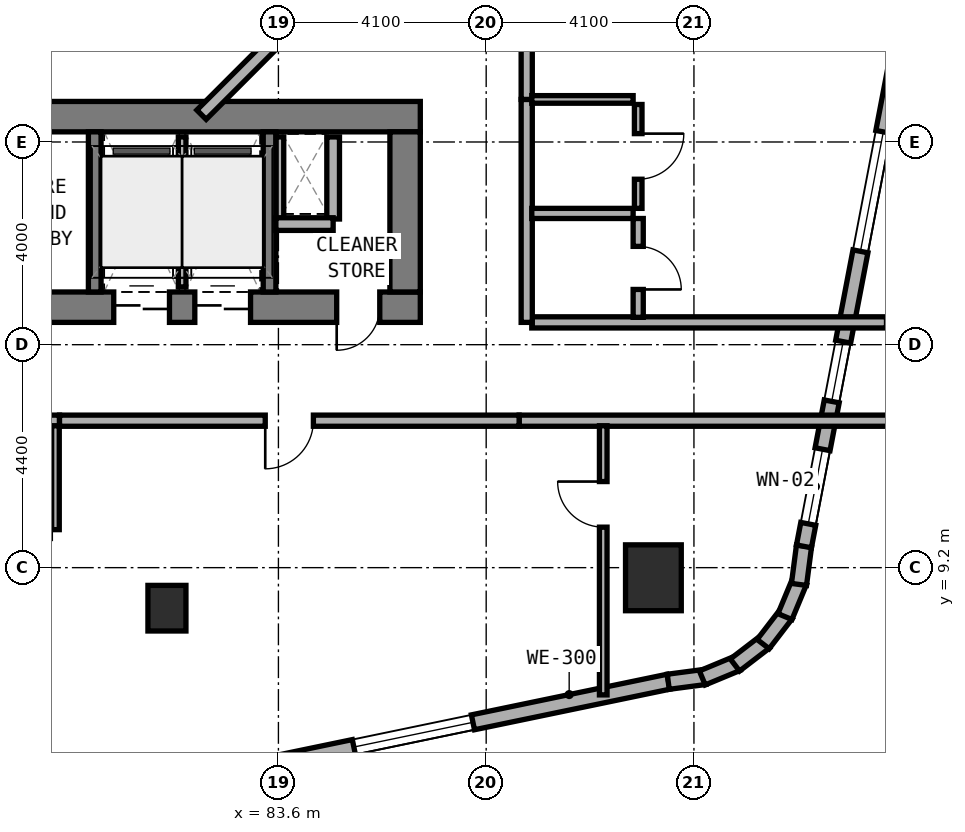
"""IFC4 building model, lengths in metres.
Left out: names, types, materials, properties, quantities, classifications, styles, units other than length and angle.
Written with IfcOpenShell. Run it as: python <this file> out.ifc"""

import sys

from ifc_helpers import new_model, si_unit, direction, frame, frame_2d, origin, origin_2d, place, context, subcontext, project, spatial, rectangle, extrude, element, fill, save


model = new_model("IFC4")
c1 = context("Model", 3, precision=1e-05, world=origin(), true_north=direction((0.0, 1.0)))
c2 = subcontext(c1, "Body", "Model", "MODEL_VIEW")
j1 = project(units=[si_unit("LENGTHUNIT", "METRE"), si_unit("PLANEANGLEUNIT", "RADIAN")], contexts=[c1])
p1 = place(None, origin())
s1 = spatial("IfcSite", under=j1, at=p1, CompositionType="ELEMENT")
p2 = place(p1, origin())
s2 = spatial("IfcBuilding", under=s1, at=p2, CompositionType="ELEMENT")
p3 = place(p2, frame((0.0, 0.0, 48.5)))
s3 = spatial("IfcBuildingStorey", under=s2, at=p3, CompositionType="ELEMENT", Elevation=48.5)
p4 = place(p3, frame((67.8, 14.34, 0.0), z_axis=(0.0, 0.0, 1.0), x_axis=(1.0, 0.0, 0.0)))
e1 = element("IfcWall", 1, at=p4, inside=s3, PredefinedType="SHEAR", context=c2, shape_type="SweptSolid", body=[
    extrude(rectangle(XDim=18.6, YDim=0.6, at=frame_2d((9.3, 0.0))), origin(), (0.0, 0.0, 1.0), 3.5),
])
p5 = place(p4, frame((9.35, 0.0, 0.0)))
e2 = element("IfcOpeningElement", 2, at=p5, cuts=e1, PredefinedType="OPENING", context=c2, shape_type="SweptSolid", body=[
    extrude(rectangle(XDim=1.2, YDim=2.15, at=frame_2d((0.6, 1.075))), frame((0.0, 0.31, 0.0), z_axis=(0.0, -1.0, 0.0), x_axis=(1.0, 0.0, 0.0)), (0.0, 0.0, 1.0), 0.62),
])
p6 = place(p4, frame((16.95, 0.0, 0.0)))
e3 = element("IfcOpeningElement", 3, at=p6, cuts=e1, PredefinedType="OPENING", context=c2, shape_type="SweptSolid", body=[
    extrude(rectangle(XDim=0.85, YDim=2.1, at=frame_2d((0.425, 1.05))), frame((0.0, 0.31, 0.0), z_axis=(0.0, -1.0, 0.0), x_axis=(1.0, 0.0, 0.0)), (0.0, 0.0, 1.0), 0.62),
])
p7 = place(p4, frame((12.55, 0.0, 0.0)))
e4 = element("IfcOpeningElement", 4, at=p7, cuts=e1, PredefinedType="OPENING", context=c2, shape_type="SweptSolid", body=[
    extrude(rectangle(XDim=1.1, YDim=2.15, at=frame_2d((0.55, 1.075))), frame((0.0, 0.31, 0.0), z_axis=(0.0, -1.0, 0.0), x_axis=(1.0, 0.0, 0.0)), (0.0, 0.0, 1.0), 0.62),
])
p8 = place(p4, frame((14.15, 0.0, 0.0)))
e5 = element("IfcOpeningElement", 5, at=p8, cuts=e1, PredefinedType="OPENING", context=c2, shape_type="SweptSolid", body=[
    extrude(rectangle(XDim=1.1, YDim=2.15, at=frame_2d((0.55, 1.075))), frame((0.0, 0.31, 0.0), z_axis=(0.0, -1.0, 0.0), x_axis=(1.0, 0.0, 0.0)), (0.0, 0.0, 1.0), 0.62),
])
p9 = place(p3, frame((67.8, 18.1, 0.0), z_axis=(0.0, 0.0, 1.0), x_axis=(1.0, 0.0, 0.0)))
e6 = element("IfcWall", 6, at=p9, inside=s3, PredefinedType="SHEAR", context=c2, shape_type="SweptSolid", body=[
    extrude(rectangle(XDim=18.6, YDim=0.6, at=frame_2d((9.3, 0.0))), origin(), (0.0, 0.0, 1.0), 3.5),
])
p10 = place(p3, frame((86.1, 14.64, 0.0), z_axis=(0.0, 0.0, 1.0), x_axis=(0.0, 1.0, 0.0)))
e7 = element("IfcWall", 7, at=p10, inside=s3, PredefinedType="SHEAR", context=c2, shape_type="SweptSolid", body=[
    extrude(rectangle(XDim=3.16, YDim=0.6, at=frame_2d((1.58, 0.0))), origin(), (0.0, 0.0, 1.0), 3.5),
])
for number, where, z_axis, x_axis in (
    (8, (79.975, 14.64, 0.0), (0.0, 0.0, 1.0), (0.0, 1.0, 0.0)),
    (9, (83.425, 14.64, 0.0), (0.0, 0.0, 1.0), (0.0, 1.0, 0.0)),
):
    element("IfcWall", number, at=place(p3, frame(where, z_axis=z_axis, x_axis=x_axis)), inside=s3, PredefinedType="STANDARD", context=c2, shape_type="SweptSolid", body=[
        extrude(rectangle(XDim=3.16, YDim=0.25, at=frame_2d((1.58, 0.0))), origin(), (0.0, 0.0, 1.0), 3.25),
    ])
p11 = place(p3, frame((81.4, 8.4, 0.0), z_axis=(0.0, 0.0, 1.0), x_axis=(1.0, 0.0, 0.0)))
e10 = element("IfcColumn", 10, at=p11, inside=s3, PredefinedType="COLUMN", context=c2, shape_type="SweptSolid", body=[
    extrude(rectangle(XDim=0.75, YDim=0.9, at=origin_2d()), origin(), (0.0, 0.0, 1.0), 3.5),
])
p12 = place(p3, frame((91.0, 9.0, 0.0), z_axis=(0.0, 0.0, 1.0), x_axis=(1.0, 0.0, 0.0)))
e11 = element("IfcColumn", 11, at=p12, inside=s3, PredefinedType="COLUMN", context=c2, shape_type="SweptSolid", body=[
    extrude(rectangle(XDim=1.1, YDim=1.3, at=origin_2d()), origin(), (0.0, 0.0, 1.0), 3.5),
])
p13 = place(p3, frame((82.594, 5.142, 0.0), z_axis=(0.0, 0.0, 1.0), x_axis=(0.979125485139, 0.203256695712, 0.0)))
e12 = element("IfcWall", 12, at=p13, inside=s3, PredefinedType="STANDARD", context=c2, shape_type="SweptSolid", body=[
    extrude(rectangle(XDim=8.89, YDim=0.3, at=frame_2d((4.445, 0.0))), origin(), (0.0, 0.0, 1.0), 3.25),
])
p14 = place(p13, frame((2.548, 0.0, 0.8)))
e13 = element("IfcOpeningElement", 13, at=p14, cuts=e12, PredefinedType="OPENING", context=c2, shape_type="SweptSolid", body=[
    extrude(rectangle(XDim=2.4, YDim=1.6, at=frame_2d((1.2, 0.8))), frame((0.0, 0.16, 0.0), z_axis=(0.0, -1.0, 0.0), x_axis=(1.0, 0.0, 0.0)), (0.0, 0.0, 1.0), 0.32),
])
p15 = place(p3, frame((91.293, 6.948, 0.0), z_axis=(0.0, 0.0, 1.0), x_axis=(0.991486167159, 0.13021205909, 0.0)))
e14 = element("IfcWall", 14, at=p15, inside=s3, PredefinedType="STANDARD", context=c2, shape_type="SweptSolid", body=[
    extrude(rectangle(XDim=0.729, YDim=0.3, at=frame_2d((0.365, 0.0))), origin(), (0.0, 0.0, 1.0), 3.25),
])
for number, where, z_axis, x_axis in (
    (15, (91.965, 7.024, 0.0), (0.0, 0.0, 1.0), (0.924, 0.384, 0.0)),
    (16, (92.609, 7.279, 0.0), (0.0, 0.0, 1.0), (0.794, 0.608, 0.0)),
    (17, (93.166, 7.691, 0.0), (0.0, 0.0, 1.0), (0.609, 0.793, 0.0)),
):
    element("IfcWall", number, at=place(p3, frame(where, z_axis=z_axis, x_axis=x_axis)), inside=s3, PredefinedType="STANDARD", context=c2, shape_type="SweptSolid", body=[
        extrude(rectangle(XDim=0.746, YDim=0.3, at=frame_2d((0.373, 0.0))), origin(), (0.0, 0.0, 1.0), 3.25),
    ])
p16 = place(p3, frame((93.596, 8.234, 0.0), z_axis=(0.0, 0.0, 1.0), x_axis=(0.383430326427, 0.923569805037, 0.0)))
e18 = element("IfcWall", 18, at=p16, inside=s3, PredefinedType="STANDARD", context=c2, shape_type="SweptSolid", body=[
    extrude(rectangle(XDim=0.746, YDim=0.3, at=frame_2d((0.373, 0.0))), origin(), (0.0, 0.0, 1.0), 3.25),
])
p17 = place(p3, frame((93.873, 8.869, 0.0), z_axis=(0.0, 0.0, 1.0), x_axis=(0.129339184068, 0.991600411186, 0.0)))
e19 = element("IfcWall", 19, at=p17, inside=s3, PredefinedType="STANDARD", context=c2, shape_type="SweptSolid", body=[
    extrude(rectangle(XDim=0.764, YDim=0.3, at=frame_2d((0.382, 0.0))), origin(), (0.0, 0.0, 1.0), 3.25),
])
p18 = place(p3, frame((93.971, 9.62, 0.0), z_axis=(0.0, 0.0, 1.0), x_axis=(0.188087874316, 0.982152203854, 0.0)))
e20 = element("IfcWall", 20, at=p18, inside=s3, PredefinedType="STANDARD", context=c2, shape_type="SweptSolid", body=[
    extrude(rectangle(XDim=9.634, YDim=0.3, at=frame_2d((4.817, 0.0))), origin(), (0.0, 0.0, 1.0), 3.25),
])
p19 = place(p18, frame((0.452, 0.0, 0.85)))
e21 = element("IfcOpeningElement", 21, at=p19, cuts=e20, PredefinedType="OPENING", context=c2, shape_type="SweptSolid", body=[
    extrude(rectangle(XDim=1.5, YDim=1.5, at=frame_2d((0.75, 0.75))), frame((0.0, 0.16, 0.0), z_axis=(0.0, -1.0, 0.0), x_axis=(1.0, 0.0, 0.0)), (0.0, 0.0, 1.0), 0.32),
])
p20 = place(p18, frame((2.913, 0.0, 0.85)))
e22 = element("IfcOpeningElement", 22, at=p20, cuts=e20, PredefinedType="OPENING", context=c2, shape_type="SweptSolid", body=[
    extrude(rectangle(XDim=1.2, YDim=1.5, at=frame_2d((0.6, 0.75))), frame((0.0, 0.16, 0.0), z_axis=(0.0, -1.0, 0.0), x_axis=(1.0, 0.0, 0.0)), (0.0, 0.0, 1.0), 0.32),
])
p21 = place(p18, frame((5.928, 0.0, 0.8)))
e23 = element("IfcOpeningElement", 23, at=p21, cuts=e20, PredefinedType="OPENING", context=c2, shape_type="SweptSolid", body=[
    extrude(rectangle(XDim=2.4, YDim=1.6, at=frame_2d((1.2, 0.8))), frame((0.0, 0.16, 0.0), z_axis=(0.0, -1.0, 0.0), x_axis=(1.0, 0.0, 0.0)), (0.0, 0.0, 1.0), 0.32),
])
p22 = place(p3, frame((82.082, 18.138, 0.0), z_axis=(0.0, 0.0, 1.0), x_axis=(0.707106781187, 0.707106781187, 0.0)))
e24 = element("IfcWall", 24, at=p22, inside=s3, PredefinedType="STANDARD", context=c2, shape_type="SweptSolid", body=[
    extrude(rectangle(XDim=2.311, YDim=0.26, at=frame_2d((1.155, 0.0))), origin(), (0.0, 0.0, 1.0), 3.25),
])
p23 = place(p3, frame((83.63, 16.08, 0.0), z_axis=(0.0, 0.0, 1.0), x_axis=(0.0, 1.0, 0.0)))
e25 = element("IfcWall", 25, at=p23, inside=s3, PredefinedType="PARTITIONING", context=c2, shape_type="SweptSolid", body=[
    extrude(rectangle(XDim=1.62, YDim=0.15, at=frame_2d((0.81, 0.0))), origin(), (0.0, 0.0, 1.0), 2.725),
])
p24 = place(p3, frame((84.68, 16.08, 0.0), z_axis=(0.0, 0.0, 1.0), x_axis=(0.0, 1.0, 0.0)))
e26 = element("IfcWall", 26, at=p24, inside=s3, PredefinedType="SOLIDWALL", context=c2, shape_type="SweptSolid", body=[
    extrude(rectangle(XDim=1.62, YDim=0.25, at=frame_2d((0.81, 0.0))), origin(), (0.0, 0.0, 1.0), 3.22),
])
p25 = place(p3, frame((83.55, 15.98, 0.0), z_axis=(0.0, 0.0, 1.0), x_axis=(1.0, 0.0, 0.0)))
e27 = element("IfcWall", 27, at=p25, inside=s3, PredefinedType="SOLIDWALL", context=c2, shape_type="SweptSolid", body=[
    extrude(rectangle(XDim=1.13, YDim=0.25, at=frame_2d((0.565, 0.0))), origin(), (0.0, 0.0, 1.0), 3.22),
])
p26 = place(p3, frame((81.7, 14.74, 0.0), z_axis=(0.0, 0.0, 1.0), x_axis=(0.0, 1.0, 0.0)))
e28 = element("IfcWall", 28, at=p26, inside=s3, PredefinedType="PARTITIONING", context=c2, shape_type="SweptSolid", body=[
    extrude(rectangle(XDim=2.96, YDim=0.15, at=frame_2d((1.48, 0.0))), origin(), (0.0, 0.0, 1.0), 3.22),
])
p27 = place(p3, frame((72.6, 12.1, 0.0), z_axis=(0.0, 0.0, 1.0), x_axis=(1.0, 0.0, 0.0)))
e29 = element("IfcWall", 29, at=p27, inside=s3, PredefinedType="SOLIDWALL", context=c2, shape_type="SweptSolid", body=[
    extrude(rectangle(XDim=6.68, YDim=0.22, at=frame_2d((3.34, 0.0))), origin(), (0.0, 0.0, 1.0), 2.725),
])
p28 = place(p3, frame((88.35, 12.1, 0.0), z_axis=(0.0, 0.0, 1.0), x_axis=(1.0, 0.0, 0.0)))
e30 = element("IfcWall", 30, at=p28, inside=s3, PredefinedType="SOLIDWALL", context=c2, shape_type="SweptSolid", body=[
    extrude(rectangle(XDim=7.41, YDim=0.22, at=frame_2d((3.705, 0.0))), origin(), (0.0, 0.0, 1.0), 2.865),
])
p29 = place(p3, frame((79.28, 12.1, 0.0), z_axis=(0.0, 0.0, 1.0), x_axis=(1.0, 0.0, 0.0)))
e31 = element("IfcWall", 31, at=p29, inside=s3, PredefinedType="SOLIDWALL", context=c2, shape_type="SweptSolid", body=[
    extrude(rectangle(XDim=9.07, YDim=0.22, at=frame_2d((4.535, 0.0))), origin(), (0.0, 0.0, 1.0), 2.725),
])
p30 = place(p29, frame((4.06, 0.0, 0.0)))
e32 = element("IfcOpeningElement", 32, at=p30, cuts=e31, PredefinedType="OPENING", context=c2, shape_type="SweptSolid", body=[
    extrude(rectangle(XDim=0.95, YDim=2.1, at=frame_2d((0.475, 1.05))), frame((0.0, 0.12, 0.0), z_axis=(0.0, -1.0, 0.0), x_axis=(1.0, 0.0, 0.0)), (0.0, 0.0, 1.0), 0.24),
])
p31 = place(p3, frame((90.01, 6.689, 0.0), z_axis=(0.0, 0.0, 1.0), x_axis=(0.0, 1.0, 0.0)))
e33 = element("IfcWall", 33, at=p31, inside=s3, PredefinedType="PARTITIONING", context=c2, shape_type="SweptSolid", body=[
    extrude(rectangle(XDim=5.311, YDim=0.15, at=frame_2d((2.656, 0.0))), origin(), (0.0, 0.0, 1.0), 2.865),
])
p32 = place(p31, frame((3.31, 0.0, 0.0)))
e34 = element("IfcOpeningElement", 34, at=p32, cuts=e33, PredefinedType="OPENING", context=c2, shape_type="SweptSolid", body=[
    extrude(rectangle(XDim=0.9, YDim=2.1, at=frame_2d((0.45, 1.05))), frame((0.0, 0.085, 0.0), z_axis=(0.0, -1.0, 0.0), x_axis=(1.0, 0.0, 0.0)), (0.0, 0.0, 1.0), 0.17),
])
p33 = place(p3, frame((79.2, 9.95, 0.0), z_axis=(0.0, 0.0, 1.0), x_axis=(0.0, 1.0, 0.0)))
e35 = element("IfcWall", 35, at=p33, inside=s3, PredefinedType="PARTITIONING", context=c2, shape_type="SweptSolid", body=[
    extrude(rectangle(XDim=2.05, YDim=0.15, at=frame_2d((1.025, 0.0))), origin(), (0.0, 0.0, 1.0), 2.985),
])
p34 = place(p3, frame((88.6, 14.04, 0.0), z_axis=(0.0, 0.0, 1.0), x_axis=(1.0, 0.0, 0.0)))
e36 = element("IfcWall", 36, at=p34, inside=s3, PredefinedType="SOLIDWALL", context=c2, shape_type="SweptSolid", body=[
    extrude(rectangle(XDim=7.0, YDim=0.22, at=frame_2d((3.5, 0.0))), origin(), (0.0, 0.0, 1.0), 2.865),
])
p35 = place(p3, frame((88.5, 14.04, 0.0), z_axis=(0.0, 0.0, 1.0), x_axis=(0.0, 1.0, 0.0)))
e37 = element("IfcWall", 37, at=p35, inside=s3, PredefinedType="SOLIDWALL", context=c2, shape_type="SweptSolid", body=[
    extrude(rectangle(XDim=4.4, YDim=0.22, at=frame_2d((2.2, 0.0))), origin(), (0.0, 0.0, 1.0), 3.22),
])
p36 = place(p3, frame((88.5, 18.44, 0.0), z_axis=(0.0, 0.0, 1.0), x_axis=(0.0, 1.0, 0.0)))
e38 = element("IfcWall", 38, at=p36, inside=s3, PredefinedType="SOLIDWALL", context=c2, shape_type="SweptSolid", body=[
    extrude(rectangle(XDim=5.06, YDim=0.22, at=frame_2d((2.53, 0.0))), origin(), (0.0, 0.0, 1.0), 2.725),
])
p37 = place(p36, frame((2.055, 0.0, 0.0)))
e39 = element("IfcOpeningElement", 39, at=p37, cuts=e38, PredefinedType="OPENING", context=c2, shape_type="SweptSolid", body=[
    extrude(rectangle(XDim=0.95, YDim=2.1, at=frame_2d((0.475, 1.05))), frame((0.0, 0.12, 0.0), z_axis=(0.0, -1.0, 0.0), x_axis=(1.0, 0.0, 0.0)), (0.0, 0.0, 1.0), 0.24),
])
p38 = place(p3, frame((88.6, 16.19, 0.0), z_axis=(0.0, 0.0, 1.0), x_axis=(1.0, 0.0, 0.0)))
e40 = element("IfcWall", 40, at=p38, inside=s3, PredefinedType="PLUMBINGWALL", context=c2, shape_type="SweptSolid", body=[
    extrude(rectangle(XDim=2.0, YDim=0.2, at=frame_2d((1.0, 0.0))), origin(), (0.0, 0.0, 1.0), 3.22),
])
p39 = place(p3, frame((88.6, 18.44, 0.0), z_axis=(0.0, 0.0, 1.0), x_axis=(1.0, 0.0, 0.0)))
e41 = element("IfcWall", 41, at=p39, inside=s3, PredefinedType="PARTITIONING", context=c2, shape_type="SweptSolid", body=[
    extrude(rectangle(XDim=2.0, YDim=0.15, at=frame_2d((1.0, 0.0))), origin(), (0.0, 0.0, 1.0), 3.22),
])
p40 = place(p3, frame((90.7, 14.14, 0.0), z_axis=(0.0, 0.0, 1.0), x_axis=(0.0, 1.0, 0.0)))
e42 = element("IfcWall", 42, at=p40, inside=s3, PredefinedType="PLUMBINGWALL", context=c2, shape_type="SweptSolid", body=[
    extrude(rectangle(XDim=1.95, YDim=0.2, at=frame_2d((0.975, 0.0))), origin(), (0.0, 0.0, 1.0), 3.22),
])
p41 = place(p40, frame((0.55, 0.0, 0.0)))
e43 = element("IfcOpeningElement", 43, at=p41, cuts=e42, PredefinedType="OPENING", context=c2, shape_type="SweptSolid", body=[
    extrude(rectangle(XDim=0.85, YDim=2.1, at=frame_2d((0.425, 1.05))), frame((0.0, 0.11, 0.0), z_axis=(0.0, -1.0, 0.0), x_axis=(1.0, 0.0, 0.0)), (0.0, 0.0, 1.0), 0.22),
])
p42 = place(p3, frame((90.7, 16.29, 0.0), z_axis=(0.0, 0.0, 1.0), x_axis=(0.0, 1.0, 0.0)))
e44 = element("IfcWall", 44, at=p42, inside=s3, PredefinedType="PARTITIONING", context=c2, shape_type="SweptSolid", body=[
    extrude(rectangle(XDim=2.05, YDim=0.15, at=frame_2d((1.025, 0.0))), origin(), (0.0, 0.0, 1.0), 3.22),
])
p43 = place(p42, frame((0.575, 0.0, 0.0)))
e45 = element("IfcOpeningElement", 45, at=p43, cuts=e44, PredefinedType="OPENING", context=c2, shape_type="SweptSolid", body=[
    extrude(rectangle(XDim=0.9, YDim=2.1, at=frame_2d((0.45, 1.05))), frame((0.0, 0.085, 0.0), z_axis=(0.0, -1.0, 0.0), x_axis=(1.0, 0.0, 0.0)), (0.0, 0.0, 1.0), 0.17),
])
p44 = place(p14, origin())
e46 = element("IfcWindow", 46, at=p44, inside=s3, PartitioningType="SINGLE_PANEL", PredefinedType="WINDOW", context=c2, shape_type="SweptSolid", body=[
    extrude(rectangle(XDim=2.4, YDim=1.6, at=frame_2d((1.2, 0.8))), frame((0.0, 0.03, 0.0), z_axis=(0.0, -1.0, 0.0), x_axis=(1.0, 0.0, 0.0)), (0.0, 0.0, 1.0), 0.06),
])
fill(e13, e46)
p45 = place(p19, origin())
e47 = element("IfcWindow", 47, at=p45, inside=s3, PartitioningType="SINGLE_PANEL", PredefinedType="WINDOW", context=c2, shape_type="SweptSolid", body=[
    extrude(rectangle(XDim=1.5, YDim=1.5, at=frame_2d((0.75, 0.75))), frame((0.0, 0.03, 0.0), z_axis=(0.0, -1.0, 0.0), x_axis=(1.0, 0.0, 0.0)), (0.0, 0.0, 1.0), 0.06),
])
fill(e21, e47)
p46 = place(p20, origin())
e48 = element("IfcWindow", 48, at=p46, inside=s3, PartitioningType="SINGLE_PANEL", PredefinedType="WINDOW", context=c2, shape_type="SweptSolid", body=[
    extrude(rectangle(XDim=1.2, YDim=1.5, at=frame_2d((0.6, 0.75))), frame((0.0, 0.03, 0.0), z_axis=(0.0, -1.0, 0.0), x_axis=(1.0, 0.0, 0.0)), (0.0, 0.0, 1.0), 0.06),
])
fill(e22, e48)
p47 = place(p21, origin())
e49 = element("IfcWindow", 49, at=p47, inside=s3, PartitioningType="SINGLE_PANEL", PredefinedType="WINDOW", context=c2, shape_type="SweptSolid", body=[
    extrude(rectangle(XDim=2.4, YDim=1.6, at=frame_2d((1.2, 0.8))), frame((0.0, 0.03, 0.0), z_axis=(0.0, -1.0, 0.0), x_axis=(1.0, 0.0, 0.0)), (0.0, 0.0, 1.0), 0.06),
])
fill(e23, e49)
p48 = place(p6, frame((0.85, 0.0, 0.0), z_axis=(0.0, 0.0, 1.0), x_axis=(-1.0, 0.0, 0.0)))
e50 = element("IfcDoor", 50, at=p48, inside=s3, OperationType="SINGLE_SWING_RIGHT", PredefinedType="DOOR", context=c2, shape_type="SweptSolid", body=[
    extrude(rectangle(XDim=0.85, YDim=2.1, at=frame_2d((0.425, 1.05))), frame((0.0, 0.025, 0.0), z_axis=(0.0, -1.0, 0.0), x_axis=(1.0, 0.0, 0.0)), (0.0, 0.0, 1.0), 0.05),
])
fill(e3, e50)
p49 = place(p7, frame((1.1, 0.0, 0.0), z_axis=(0.0, 0.0, 1.0), x_axis=(-1.0, 0.0, 0.0)))
e51 = element("IfcDoor", 51, at=p49, inside=s3, OperationType="DOUBLE_DOOR_SLIDING", PredefinedType="DOOR", context=c2, shape_type="SweptSolid", body=[
    extrude(rectangle(XDim=1.1, YDim=2.15, at=frame_2d((0.55, 1.075))), frame((0.0, 0.025, 0.0), z_axis=(0.0, -1.0, 0.0), x_axis=(1.0, 0.0, 0.0)), (0.0, 0.0, 1.0), 0.05),
])
fill(e4, e51)
p50 = place(p8, frame((1.1, 0.0, 0.0), z_axis=(0.0, 0.0, 1.0), x_axis=(-1.0, 0.0, 0.0)))
e52 = element("IfcDoor", 52, at=p50, inside=s3, OperationType="DOUBLE_DOOR_SLIDING", PredefinedType="DOOR", context=c2, shape_type="SweptSolid", body=[
    extrude(rectangle(XDim=1.1, YDim=2.15, at=frame_2d((0.55, 1.075))), frame((0.0, 0.025, 0.0), z_axis=(0.0, -1.0, 0.0), x_axis=(1.0, 0.0, 0.0)), (0.0, 0.0, 1.0), 0.05),
])
fill(e5, e52)
p51 = place(p30, frame((0.95, 0.0, 0.0), z_axis=(0.0, 0.0, 1.0), x_axis=(-1.0, 0.0, 0.0)))
e53 = element("IfcDoor", 53, at=p51, inside=s3, OperationType="SINGLE_SWING_RIGHT", PredefinedType="DOOR", context=c2, shape_type="SweptSolid", body=[
    extrude(rectangle(XDim=0.95, YDim=2.1, at=frame_2d((0.475, 1.05))), frame((0.0, 0.025, 0.0), z_axis=(0.0, -1.0, 0.0), x_axis=(1.0, 0.0, 0.0)), (0.0, 0.0, 1.0), 0.05),
])
fill(e32, e53)
p52 = place(p32, origin())
e54 = element("IfcDoor", 54, at=p52, inside=s3, OperationType="SINGLE_SWING_RIGHT", PredefinedType="DOOR", context=c2, shape_type="SweptSolid", body=[
    extrude(rectangle(XDim=0.9, YDim=2.1, at=frame_2d((0.45, 1.05))), frame((0.0, 0.025, 0.0), z_axis=(0.0, -1.0, 0.0), x_axis=(1.0, 0.0, 0.0)), (0.0, 0.0, 1.0), 0.05),
])
fill(e34, e54)
p53 = place(p41, frame((0.85, 0.0, 0.0), z_axis=(0.0, 0.0, 1.0), x_axis=(-1.0, 0.0, 0.0)))
e55 = element("IfcDoor", 55, at=p53, inside=s3, OperationType="SINGLE_SWING_RIGHT", PredefinedType="DOOR", context=c2, shape_type="SweptSolid", body=[
    extrude(rectangle(XDim=0.85, YDim=2.1, at=frame_2d((0.425, 1.05))), frame((0.0, 0.025, 0.0), z_axis=(0.0, -1.0, 0.0), x_axis=(1.0, 0.0, 0.0)), (0.0, 0.0, 1.0), 0.05),
])
fill(e43, e55)
p54 = place(p43, frame((0.9, 0.0, 0.0), z_axis=(0.0, 0.0, 1.0), x_axis=(-1.0, 0.0, 0.0)))
e56 = element("IfcDoor", 56, at=p54, inside=s3, OperationType="SINGLE_SWING_LEFT", PredefinedType="DOOR", context=c2, shape_type="SweptSolid", body=[
    extrude(rectangle(XDim=0.9, YDim=2.1, at=frame_2d((0.45, 1.05))), frame((0.0, 0.025, 0.0), z_axis=(0.0, -1.0, 0.0), x_axis=(1.0, 0.0, 0.0)), (0.0, 0.0, 1.0), 0.05),
])
fill(e45, e56)
save(model, sys.argv[1])
